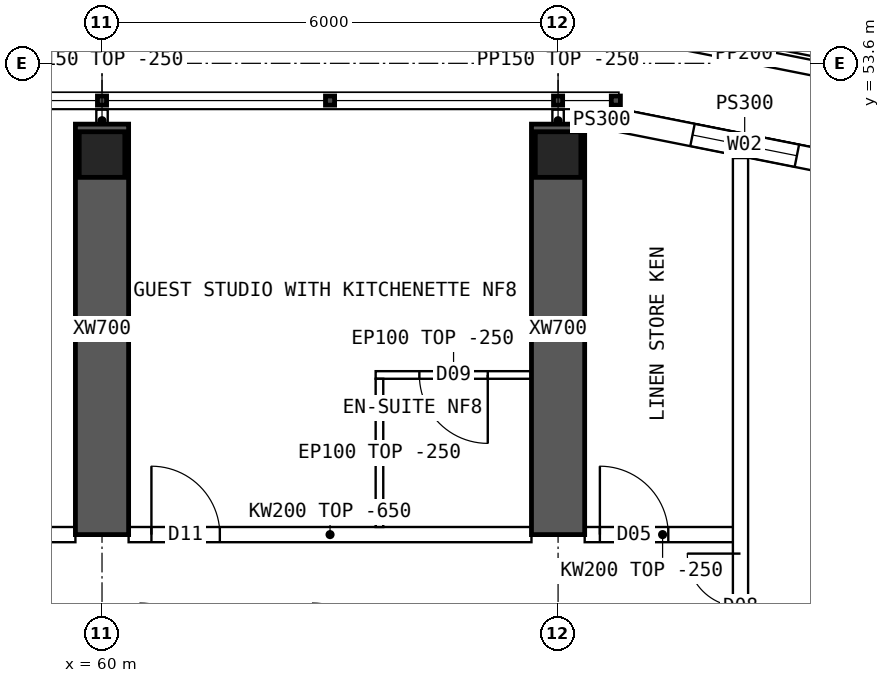
"""IFC4 building model, lengths in metres.
Left out: names, types, materials, properties, quantities, classifications, styles, units other than length and angle.
Written with IfcOpenShell. Run it as: python <this file> out.ifc"""

import sys

from ifc_helpers import new_model, si_unit, direction, frame, frame_2d, origin, origin_2d, place, context, subcontext, project, spatial, polyline, rectangle, hollow_rectangle, outline, extrude, element, fill, save


model = new_model("IFC4")
c1 = context("Model", 3, precision=1e-05, world=origin(), true_north=direction((0.0, 1.0)))
c2 = subcontext(c1, "Body", "Model", "MODEL_VIEW")
j1 = project(units=[si_unit("LENGTHUNIT", "METRE"), si_unit("PLANEANGLEUNIT", "RADIAN")], contexts=[c1])
p1 = place(None, origin())
s1 = spatial("IfcSite", under=j1, at=p1, CompositionType="ELEMENT")
p2 = place(p1, origin())
s2 = spatial("IfcBuilding", under=s1, at=p2, CompositionType="ELEMENT")
p3 = place(p2, frame((0.0, 0.0, 208.3)))
s3 = spatial("IfcBuildingStorey", under=s2, at=p3, CompositionType="ELEMENT", Elevation=208.3)
for number, where, z_axis, x_axis in (
    (1, (60.0, 52.4, 0.0), (0.0, 0.0, 1.0), (1.0, 0.0, 0.0)),
    (2, (66.0, 52.4, 0.0), (0.0, 0.0, 1.0), (1.0, 0.0, 0.0)),
):
    element("IfcColumn", number, at=place(p3, frame(where, z_axis=z_axis, x_axis=x_axis)), inside=s3, PredefinedType="COLUMN", context=c2, shape_type="SweptSolid", body=[
        extrude(hollow_rectangle(XDim=0.6, YDim=0.6, WallThickness=0.06, at=origin_2d()), origin(), (0.0, 0.0, 1.0), 4.5),
    ])
for number, where, z_axis, x_axis in (
    (3, (60.0, 47.4, 0.0), (0.0, 0.0, 1.0), (0.0, 1.0, 0.0)),
    (4, (66.0, 47.4, 0.0), (0.0, 0.0, 1.0), (0.0, 1.0, 0.0)),
):
    element("IfcWall", number, at=place(p3, frame(where, z_axis=z_axis, x_axis=x_axis)), inside=s3, PredefinedType="SHEAR", context=c2, shape_type="SweptSolid", body=[
        extrude(rectangle(XDim=5.4, YDim=0.7, at=frame_2d((2.7, 0.0))), origin(), (0.0, 0.0, 1.0), 4.5),
    ])
p4 = place(p3, frame((70.11, 52.192, 0.0), z_axis=(0.0, 0.0, 1.0), x_axis=(-0.98078325777, 0.195100490205, 0.0)))
e5 = element("IfcWall", 5, at=p4, inside=s3, PredefinedType="SOLIDWALL", context=c2, shape_type="SweptSolid", body=[
    extrude(outline(polyline([(-0.03, -0.15), (3.405, -0.15), (3.345, 0.15), (0.03, 0.15), (-0.03, -0.15)])), origin(), (0.0, 0.0, 1.0), 4.25),
])
p5 = place(p4, frame((0.988, 0.0, 0.9)))
e6 = element("IfcOpeningElement", 6, at=p5, cuts=e5, PredefinedType="OPENING", context=c2, shape_type="SweptSolid", body=[
    extrude(rectangle(XDim=1.4, YDim=1.8, at=frame_2d((0.7, 0.9))), frame((0.0, 0.16, 0.0), z_axis=(0.0, -1.0, 0.0), x_axis=(1.0, 0.0, 0.0)), (0.0, 0.0, 1.0), 0.32),
])
p6 = place(p3, frame((66.8, 52.85, 0.0), z_axis=(0.0, 0.0, 1.0), x_axis=(-1.0, 0.0, 0.0)))
e7 = element("IfcWall", 7, at=p6, inside=s3, PredefinedType="SOLIDWALL", context=c2, shape_type="SweptSolid", body=[
    extrude(rectangle(XDim=0.45, YDim=0.3, at=frame_2d((0.225, 0.0))), origin(), (0.0, 0.0, 1.0), 4.25),
])
p7 = place(p3, frame((66.785, 54.05, 0.0), z_axis=(0.0, 0.0, 1.0), x_axis=(0.980787925163, -0.195077025438, 0.0)))
e8 = element("IfcWall", 8, at=p7, inside=s3, PredefinedType="PARAPET", context=c2, shape_type="SweptSolid", body=[
    extrude(rectangle(XDim=3.389, YDim=0.2, at=frame_2d((1.695, 0.0))), origin(), (0.0, 0.0, 1.0), 1.1),
])
p8 = place(p3, frame((54.35, 47.4, 0.0), z_axis=(0.0, 0.0, 1.0), x_axis=(1.0, 0.0, 0.0)))
e9 = element("IfcWall", 9, at=p8, inside=s3, PredefinedType="SOLIDWALL", context=c2, shape_type="SweptSolid", body=[
    extrude(outline(polyline([(0.0, 0.0), (5.3, 0.0), (5.3, 3.85), (0.0, 3.85), (0.0, 0.0)])), frame((0.0, 0.1, 0.0), z_axis=(0.0, -1.0, 0.0), x_axis=(1.0, 0.0, 0.0)), (0.0, 0.0, 1.0), 0.2),
])
p9 = place(p8, frame((1.0, 0.0, 0.0)))
e10 = element("IfcOpeningElement", 10, at=p9, cuts=e9, PredefinedType="OPENING", context=c2, shape_type="SweptSolid", body=[
    extrude(rectangle(XDim=1.8, YDim=2.1, at=frame_2d((0.9, 1.05))), frame((0.0, 0.11, 0.0), z_axis=(0.0, -1.0, 0.0), x_axis=(1.0, 0.0, 0.0)), (0.0, 0.0, 1.0), 0.22),
])
p10 = place(p3, frame((60.35, 47.4, 0.0), z_axis=(0.0, 0.0, 1.0), x_axis=(1.0, 0.0, 0.0)))
e11 = element("IfcWall", 11, at=p10, inside=s3, PredefinedType="SOLIDWALL", context=c2, shape_type="SweptSolid", body=[
    extrude(outline(polyline([(0.0, 0.0), (5.3, 0.0), (5.3, 3.85), (0.0, 3.85), (0.0, 0.0)])), frame((0.0, 0.1, 0.0), z_axis=(0.0, -1.0, 0.0), x_axis=(1.0, 0.0, 0.0)), (0.0, 0.0, 1.0), 0.2),
])
p11 = place(p10, frame((0.3, 0.0, 0.0)))
e12 = element("IfcOpeningElement", 12, at=p11, cuts=e11, PredefinedType="OPENING", context=c2, shape_type="SweptSolid", body=[
    extrude(rectangle(XDim=0.9, YDim=2.1, at=frame_2d((0.45, 1.05))), frame((0.0, 0.11, 0.0), z_axis=(0.0, -1.0, 0.0), x_axis=(1.0, 0.0, 0.0)), (0.0, 0.0, 1.0), 0.22),
])
p12 = place(p3, frame((66.35, 47.4, 0.0), z_axis=(0.0, 0.0, 1.0), x_axis=(1.0, 0.0, 0.0)))
e13 = element("IfcWall", 13, at=p12, inside=s3, PredefinedType="SOLIDWALL", context=c2, shape_type="SweptSolid", body=[
    extrude(rectangle(XDim=2.05, YDim=0.2, at=frame_2d((1.025, 0.0))), origin(), (0.0, 0.0, 1.0), 4.25),
])
p13 = place(p12, frame((0.2, 0.0, 0.0)))
e14 = element("IfcOpeningElement", 14, at=p13, cuts=e13, PredefinedType="OPENING", context=c2, shape_type="SweptSolid", body=[
    extrude(rectangle(XDim=0.9, YDim=2.1, at=frame_2d((0.45, 1.05))), frame((0.0, 0.11, 0.0), z_axis=(0.0, -1.0, 0.0), x_axis=(1.0, 0.0, 0.0)), (0.0, 0.0, 1.0), 0.22),
])
p14 = place(p3, frame((63.6, 49.5, 0.0), z_axis=(0.0, 0.0, 1.0), x_axis=(1.0, 0.0, 0.0)))
e15 = element("IfcWall", 15, at=p14, inside=s3, PredefinedType="PARTITIONING", context=c2, shape_type="SweptSolid", body=[
    extrude(rectangle(XDim=2.05, YDim=0.1, at=frame_2d((1.025, 0.0))), origin(), (0.0, 0.0, 1.0), 4.25),
])
p15 = place(p14, frame((0.575, 0.0, 0.0)))
e16 = element("IfcOpeningElement", 16, at=p15, cuts=e15, PredefinedType="OPENING", context=c2, shape_type="SweptSolid", body=[
    extrude(rectangle(XDim=0.9, YDim=2.1, at=frame_2d((0.45, 1.05))), frame((0.0, 0.06, 0.0), z_axis=(0.0, -1.0, 0.0), x_axis=(1.0, 0.0, 0.0)), (0.0, 0.0, 1.0), 0.12),
])
p16 = place(p3, frame((63.65, 49.45, 0.0), z_axis=(0.0, 0.0, 1.0), x_axis=(0.0, -1.0, 0.0)))
e17 = element("IfcWall", 17, at=p16, inside=s3, PredefinedType="PARTITIONING", context=c2, shape_type="SweptSolid", body=[
    extrude(outline(polyline([(0.0, 0.0), (1.95, 0.0), (1.95, 3.85), (1.902, 3.85), (1.9, 4.25), (0.0, 4.25), (0.0, 0.0)])), frame((0.0, 0.05, 0.0), z_axis=(0.0, -1.0, 0.0), x_axis=(1.0, 0.0, 0.0)), (0.0, 0.0, 1.0), 0.1),
])
p17 = place(p3, frame((68.4, 11.646, 0.0), z_axis=(0.0, 0.0, 1.0), x_axis=(0.0, 1.0, 0.0)))
e18 = element("IfcWall", 18, at=p17, inside=s3, PredefinedType="SOLIDWALL", context=c2, shape_type="SweptSolid", body=[
    extrude(rectangle(XDim=40.708, YDim=0.2, at=frame_2d((20.354, 0.0))), origin(), (0.0, 0.0, 1.0), 4.25),
])
p18 = place(p17, frame((13.434, 0.0, 0.0)))
e19 = element("IfcOpeningElement", 19, at=p18, cuts=e18, PredefinedType="OPENING", context=c2, shape_type="SweptSolid", body=[
    extrude(rectangle(XDim=1.2, YDim=2.1, at=frame_2d((0.6, 1.05))), frame((0.0, 0.11, 0.0), z_axis=(0.0, -1.0, 0.0), x_axis=(1.0, 0.0, 0.0)), (0.0, 0.0, 1.0), 0.22),
])
p19 = place(p17, frame((21.194, 0.0, 0.0)))
e20 = element("IfcOpeningElement", 20, at=p19, cuts=e18, PredefinedType="OPENING", context=c2, shape_type="SweptSolid", body=[
    extrude(rectangle(XDim=1.2, YDim=2.1, at=frame_2d((0.6, 1.05))), frame((0.0, 0.11, 0.0), z_axis=(0.0, -1.0, 0.0), x_axis=(1.0, 0.0, 0.0)), (0.0, 0.0, 1.0), 0.22),
])
p20 = place(p17, frame((5.104, 0.0, 0.0)))
e21 = element("IfcOpeningElement", 21, at=p20, cuts=e18, PredefinedType="OPENING", context=c2, shape_type="SweptSolid", body=[
    extrude(rectangle(XDim=1.4, YDim=2.1, at=frame_2d((0.7, 1.05))), frame((0.0, 0.11, 0.0), z_axis=(0.0, -1.0, 0.0), x_axis=(1.0, 0.0, 0.0)), (0.0, 0.0, 1.0), 0.22),
])
p21 = place(p17, frame((34.104, 0.0, 0.0)))
e22 = element("IfcOpeningElement", 22, at=p21, cuts=e18, PredefinedType="OPENING", context=c2, shape_type="SweptSolid", body=[
    extrude(rectangle(XDim=1.4, YDim=2.1, at=frame_2d((0.7, 1.05))), frame((0.0, 0.11, 0.0), z_axis=(0.0, -1.0, 0.0), x_axis=(1.0, 0.0, 0.0)), (0.0, 0.0, 1.0), 0.22),
])
for number, where, z_axis, x_axis in (
    (23, (60.0, 52.7, 0.0), (0.0, 0.0, 1.0), (0.0, 1.0, 0.0)),
    (24, (66.0, 52.7, 0.0), (0.0, 0.0, 1.0), (0.0, 1.0, 0.0)),
):
    element("IfcWall", number, at=place(p3, frame(where, z_axis=z_axis, x_axis=x_axis)), inside=s3, PredefinedType="PARTITIONING", context=c2, shape_type="SweptSolid", body=[
        extrude(rectangle(XDim=0.29, YDim=0.15, at=frame_2d((0.145, 0.0))), origin(), (0.0, 0.0, 1.0), 4.25),
    ])
p22 = place(p5, origin())
e25 = element("IfcWindow", 25, at=p22, inside=s3, PartitioningType="SINGLE_PANEL", PredefinedType="WINDOW", context=c2, shape_type="SweptSolid", body=[
    extrude(rectangle(XDim=1.4, YDim=1.8, at=frame_2d((0.7, 0.9))), frame((0.0, 0.03, 0.0), z_axis=(0.0, -1.0, 0.0), x_axis=(1.0, 0.0, 0.0)), (0.0, 0.0, 1.0), 0.06),
])
fill(e6, e25)
p23 = place(p15, origin())
e26 = element("IfcDoor", 26, at=p23, inside=s3, OperationType="SINGLE_SWING_RIGHT", PredefinedType="DOOR", context=c2, shape_type="SweptSolid", body=[
    extrude(rectangle(XDim=0.9, YDim=2.1, at=frame_2d((0.45, 1.05))), frame((0.0, 0.025, 0.0), z_axis=(0.0, -1.0, 0.0), x_axis=(1.0, 0.0, 0.0)), (0.0, 0.0, 1.0), 0.05),
])
fill(e16, e26)
p24 = place(p11, origin())
e27 = element("IfcDoor", 27, at=p24, inside=s3, OperationType="SINGLE_SWING_LEFT", PredefinedType="DOOR", context=c2, shape_type="SweptSolid", body=[
    extrude(rectangle(XDim=0.9, YDim=2.1, at=frame_2d((0.45, 1.05))), frame((0.0, 0.025, 0.0), z_axis=(0.0, -1.0, 0.0), x_axis=(1.0, 0.0, 0.0)), (0.0, 0.0, 1.0), 0.05),
])
fill(e12, e27)
p25 = place(p21, origin())
e28 = element("IfcDoor", 28, at=p25, inside=s3, OperationType="DOUBLE_DOOR_SINGLE_SWING", PredefinedType="DOOR", context=c2, shape_type="SweptSolid", body=[
    extrude(rectangle(XDim=1.4, YDim=2.1, at=frame_2d((0.7, 1.05))), frame((0.0, 0.025, 0.0), z_axis=(0.0, -1.0, 0.0), x_axis=(1.0, 0.0, 0.0)), (0.0, 0.0, 1.0), 0.05),
])
fill(e22, e28)
p26 = place(p13, origin())
e29 = element("IfcDoor", 29, at=p26, inside=s3, OperationType="SINGLE_SWING_LEFT", PredefinedType="DOOR", context=c2, shape_type="SweptSolid", body=[
    extrude(rectangle(XDim=0.9, YDim=2.1, at=frame_2d((0.45, 1.05))), frame((0.0, 0.025, 0.0), z_axis=(0.0, -1.0, 0.0), x_axis=(1.0, 0.0, 0.0)), (0.0, 0.0, 1.0), 0.05),
])
fill(e14, e29)
save(model, sys.argv[1])
